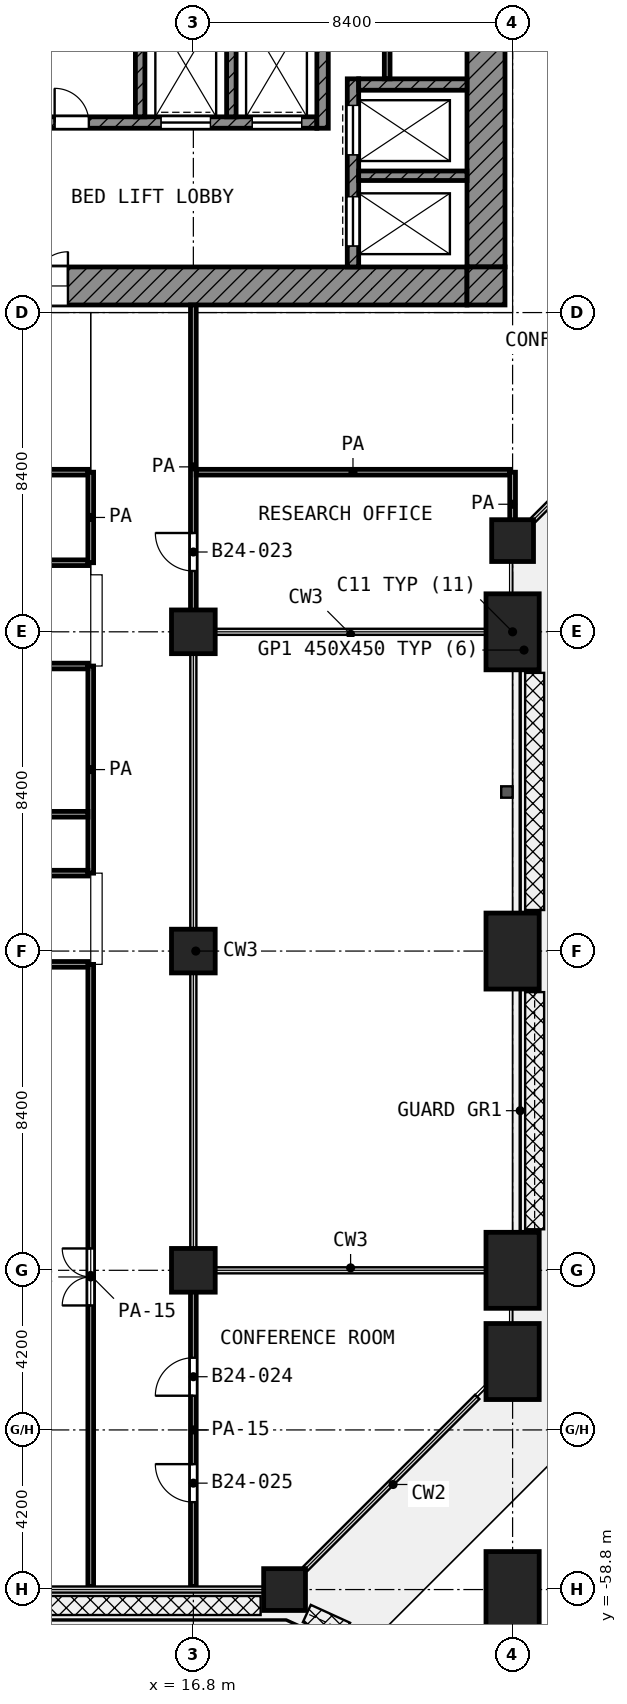
"""IFC4 building model, lengths in metres.
Left out: names, types, materials, properties, quantities, classifications, styles, units other than length and angle.
Written with IfcOpenShell. Run it as: python <this file> out.ifc"""

import sys

from ifc_helpers import new_model, si_unit, direction, frame, frame_2d, origin, origin_2d, place, context, subcontext, project, spatial, rectangle, extrude, element, fill, save


model = new_model("IFC4")
c1 = context("Model", 3, precision=1e-05, world=origin(), true_north=direction((0.0, 1.0)))
c2 = subcontext(c1, "Body", "Model", "MODEL_VIEW")
j1 = project(units=[si_unit("LENGTHUNIT", "METRE"), si_unit("PLANEANGLEUNIT", "RADIAN")], contexts=[c1])
p1 = place(None, origin())
s1 = spatial("IfcSite", under=j1, at=p1, CompositionType="ELEMENT")
p2 = place(p1, origin())
s2 = spatial("IfcBuilding", under=s1, at=p2, CompositionType="ELEMENT")
p3 = place(p2, frame((0.0, 0.0, 107.2)))
s3 = spatial("IfcBuildingStorey", under=s2, at=p3, CompositionType="ELEMENT", Elevation=107.2)
p4 = place(p3, frame((25.2, -31.2, 0.0), z_axis=(0.0, 0.0, 1.0), x_axis=(1.0, 0.0, 0.0)))
e1 = element("IfcColumn", 1, at=p4, inside=s3, PredefinedType="COLUMN", context=c2, shape_type="SweptSolid", body=[
    extrude(rectangle(XDim=1.1, YDim=1.1, at=origin_2d()), origin(), (0.0, 0.0, 1.0), 4.2),
])
for number, where, z_axis, x_axis in (
    (2, (16.8, -33.6, 0.0), (0.0, 0.0, 1.0), (1.0, 0.0, 0.0)),
    (3, (16.8, -42.0, 0.0), (0.0, 0.0, 1.0), (1.0, 0.0, 0.0)),
):
    element("IfcColumn", number, at=place(p3, frame(where, z_axis=z_axis, x_axis=x_axis)), inside=s3, PredefinedType="COLUMN", context=c2, shape_type="SweptSolid", body=[
        extrude(rectangle(XDim=1.15, YDim=1.15, at=origin_2d()), origin(), (0.0, 0.0, 1.0), 4.2),
    ])
p5 = place(p3, frame((25.2, -42.0, 0.0), z_axis=(0.0, 0.0, 1.0), x_axis=(0.0, -1.0, 0.0)))
e4 = element("IfcColumn", 4, at=p5, inside=s3, PredefinedType="COLUMN", context=c2, shape_type="SweptSolid", body=[
    extrude(rectangle(XDim=2.0, YDim=1.4, at=origin_2d()), origin(), (0.0, 0.0, 1.0), 4.2),
])
p6 = place(p3, frame((16.8, -50.4, 0.0), z_axis=(0.0, 0.0, 1.0), x_axis=(1.0, 0.0, 0.0)))
e5 = element("IfcColumn", 5, at=p6, inside=s3, PredefinedType="COLUMN", context=c2, shape_type="SweptSolid", body=[
    extrude(rectangle(XDim=1.15, YDim=1.15, at=origin_2d()), origin(), (0.0, 0.0, 1.0), 4.2),
])
p7 = place(p3, frame((25.2, -52.8, 0.0), z_axis=(0.0, 0.0, 1.0), x_axis=(0.0, -1.0, 0.0)))
e6 = element("IfcColumn", 6, at=p7, inside=s3, PredefinedType="COLUMN", context=c2, shape_type="SweptSolid", body=[
    extrude(rectangle(XDim=2.0, YDim=1.4, at=origin_2d()), origin(), (0.0, 0.0, 1.0), 4.2),
])
p8 = place(p3, frame((19.2, -58.8, 0.0), z_axis=(0.0, 0.0, 1.0), x_axis=(1.0, 0.0, 0.0)))
e7 = element("IfcColumn", 7, at=p8, inside=s3, PredefinedType="COLUMN", context=c2, shape_type="SweptSolid", body=[
    extrude(rectangle(XDim=1.1, YDim=1.1, at=origin_2d()), origin(), (0.0, 0.0, 1.0), 4.2),
])
for number, where, z_axis, x_axis in (
    (8, (25.2, -58.8, 0.0), (0.0, 0.0, 1.0), (0.0, -1.0, 0.0)),
    (9, (25.2, -33.6, 0.0), (0.0, 0.0, 1.0), (0.0, -1.0, 0.0)),
    (10, (25.2, -50.4, 0.0), (0.0, 0.0, 1.0), (0.0, -1.0, 0.0)),
):
    element("IfcColumn", number, at=place(p3, frame(where, z_axis=z_axis, x_axis=x_axis)), inside=s3, PredefinedType="COLUMN", context=c2, shape_type="SweptSolid", body=[
        extrude(rectangle(XDim=2.0, YDim=1.4, at=origin_2d()), origin(), (0.0, 0.0, 1.0), 4.2),
    ])
p9 = place(p3, frame((24.5, -24.0, 0.0), z_axis=(0.0, 0.0, 1.0), x_axis=(0.0, 1.0, 0.0)))
e11 = element("IfcWall", 11, at=p9, inside=s3, PredefinedType="SHEAR", context=c2, shape_type="SweptSolid", body=[
    extrude(rectangle(XDim=18.6, YDim=1.0, at=frame_2d((9.3, 0.0))), origin(), (0.0, 0.0, 1.0), 3.6),
])
p10 = place(p9, frame((10.5, 0.0, 0.0)))
e12 = element("IfcOpeningElement", 12, at=p10, cuts=e11, PredefinedType="OPENING", context=c2, shape_type="SweptSolid", body=[
    extrude(rectangle(XDim=1.8, YDim=2.1, at=frame_2d((0.9, 1.05))), frame((0.0, 0.51, 0.0), z_axis=(0.0, -1.0, 0.0), x_axis=(1.0, 0.0, 0.0)), (0.0, 0.0, 1.0), 1.02),
])
p11 = place(p3, frame((5.4, -24.5, 0.0), z_axis=(0.0, 0.0, 1.0), x_axis=(1.0, 0.0, 0.0)))
e13 = element("IfcWall", 13, at=p11, inside=s3, PredefinedType="SHEAR", context=c2, shape_type="SweptSolid", body=[
    extrude(rectangle(XDim=18.6, YDim=1.0, at=frame_2d((9.3, 0.0))), origin(), (0.0, 0.0, 1.0), 3.6),
])
p12 = place(p11, frame((6.3, 0.0, 0.0)))
e14 = element("IfcOpeningElement", 14, at=p12, cuts=e13, PredefinedType="OPENING", context=c2, shape_type="SweptSolid", body=[
    extrude(rectangle(XDim=1.8, YDim=2.1, at=frame_2d((0.9, 1.05))), frame((0.0, 0.51, 0.0), z_axis=(0.0, -1.0, 0.0), x_axis=(1.0, 0.0, 0.0)), (0.0, 0.0, 1.0), 1.02),
])
p13 = place(p3, frame((24.5, -25.0, 0.0), z_axis=(0.0, 0.0, 1.0), x_axis=(0.0, 1.0, 0.0)))
e15 = element("IfcWall", 15, at=p13, inside=s3, PredefinedType="SHEAR", context=c2, shape_type="SweptSolid", body=[
    extrude(rectangle(XDim=1.0, YDim=1.0, at=frame_2d((0.5, 0.0))), origin(), (0.0, 0.0, 1.0), 3.6),
])
p14 = place(p3, frame((5.4, -20.2, 0.0), z_axis=(0.0, 0.0, 1.0), x_axis=(1.0, 0.0, 0.0)))
e16 = element("IfcWall", 16, at=p14, inside=s3, PredefinedType="SHEAR", context=c2, shape_type="SweptSolid", body=[
    extrude(rectangle(XDim=14.65, YDim=0.3, at=frame_2d((7.325, 0.0))), origin(), (0.0, 0.0, 1.0), 3.6),
])
p15 = place(p14, frame((10.55, 0.0, 0.0)))
e17 = element("IfcOpeningElement", 17, at=p15, cuts=e16, PredefinedType="OPENING", context=c2, shape_type="SweptSolid", body=[
    extrude(rectangle(XDim=1.3, YDim=2.1, at=frame_2d((0.65, 1.05))), frame((0.0, 0.16, 0.0), z_axis=(0.0, -1.0, 0.0), x_axis=(1.0, 0.0, 0.0)), (0.0, 0.0, 1.0), 0.32),
])
p16 = place(p14, frame((12.95, 0.0, 0.0)))
e18 = element("IfcOpeningElement", 18, at=p16, cuts=e16, PredefinedType="OPENING", context=c2, shape_type="SweptSolid", body=[
    extrude(rectangle(XDim=1.3, YDim=2.1, at=frame_2d((0.65, 1.05))), frame((0.0, 0.16, 0.0), z_axis=(0.0, -1.0, 0.0), x_axis=(1.0, 0.0, 0.0)), (0.0, 0.0, 1.0), 0.32),
])
p17 = place(p14, frame((0.55, 0.0, 0.0)))
e19 = element("IfcOpeningElement", 19, at=p17, cuts=e16, PredefinedType="OPENING", context=c2, shape_type="SweptSolid", body=[
    extrude(rectangle(XDim=1.3, YDim=2.1, at=frame_2d((0.65, 1.05))), frame((0.0, 0.16, 0.0), z_axis=(0.0, -1.0, 0.0), x_axis=(1.0, 0.0, 0.0)), (0.0, 0.0, 1.0), 0.32),
])
p18 = place(p14, frame((2.95, 0.0, 0.0)))
e20 = element("IfcOpeningElement", 20, at=p18, cuts=e16, PredefinedType="OPENING", context=c2, shape_type="SweptSolid", body=[
    extrude(rectangle(XDim=1.3, YDim=2.1, at=frame_2d((0.65, 1.05))), frame((0.0, 0.16, 0.0), z_axis=(0.0, -1.0, 0.0), x_axis=(1.0, 0.0, 0.0)), (0.0, 0.0, 1.0), 0.32),
])
p19 = place(p14, frame((5.35, 0.0, 0.0)))
e21 = element("IfcOpeningElement", 21, at=p19, cuts=e16, PredefinedType="OPENING", context=c2, shape_type="SweptSolid", body=[
    extrude(rectangle(XDim=0.9, YDim=2.1, at=frame_2d((0.45, 1.05))), frame((0.0, 0.16, 0.0), z_axis=(0.0, -1.0, 0.0), x_axis=(1.0, 0.0, 0.0)), (0.0, 0.0, 1.0), 0.32),
])
p20 = place(p14, frame((7.75, 0.0, 0.0)))
e22 = element("IfcOpeningElement", 22, at=p20, cuts=e16, PredefinedType="OPENING", context=c2, shape_type="SweptSolid", body=[
    extrude(rectangle(XDim=0.9, YDim=2.1, at=frame_2d((0.45, 1.05))), frame((0.0, 0.16, 0.0), z_axis=(0.0, -1.0, 0.0), x_axis=(1.0, 0.0, 0.0)), (0.0, 0.0, 1.0), 0.32),
])
p21 = place(p3, frame((20.2, -20.35, 0.0), z_axis=(0.0, 0.0, 1.0), x_axis=(0.0, 1.0, 0.0)))
e23 = element("IfcWall", 23, at=p21, inside=s3, PredefinedType="SHEAR", context=c2, shape_type="SweptSolid", body=[
    extrude(rectangle(XDim=3.45, YDim=0.3, at=frame_2d((1.725, 0.0))), origin(), (0.0, 0.0, 1.0), 3.6),
])
p22 = place(p3, frame((21.15, -19.2, 0.0), z_axis=(0.0, 0.0, 1.0), x_axis=(1.0, 0.0, 0.0)))
e24 = element("IfcWall", 24, at=p22, inside=s3, PredefinedType="SHEAR", context=c2, shape_type="SweptSolid", body=[
    extrude(rectangle(XDim=2.85, YDim=0.3, at=frame_2d((1.425, 0.0))), origin(), (0.0, 0.0, 1.0), 3.6),
])
p23 = place(p3, frame((21.0, -24.0, 0.0), z_axis=(0.0, 0.0, 1.0), x_axis=(0.0, 1.0, 0.0)))
e25 = element("IfcWall", 25, at=p23, inside=s3, PredefinedType="SHEAR", context=c2, shape_type="SweptSolid", body=[
    extrude(rectangle(XDim=4.95, YDim=0.3, at=frame_2d((2.475, 0.0))), origin(), (0.0, 0.0, 1.0), 3.6),
])
p24 = place(p23, frame((2.95, 0.0, 0.0)))
e26 = element("IfcOpeningElement", 26, at=p24, cuts=e25, PredefinedType="OPENING", context=c2, shape_type="SweptSolid", body=[
    extrude(rectangle(XDim=1.3, YDim=2.1, at=frame_2d((0.65, 1.05))), frame((0.0, 0.16, 0.0), z_axis=(0.0, -1.0, 0.0), x_axis=(1.0, 0.0, 0.0)), (0.0, 0.0, 1.0), 0.32),
])
p25 = place(p23, frame((0.55, 0.0, 0.0)))
e27 = element("IfcOpeningElement", 27, at=p25, cuts=e25, PredefinedType="OPENING", context=c2, shape_type="SweptSolid", body=[
    extrude(rectangle(XDim=1.3, YDim=2.1, at=frame_2d((0.65, 1.05))), frame((0.0, 0.16, 0.0), z_axis=(0.0, -1.0, 0.0), x_axis=(1.0, 0.0, 0.0)), (0.0, 0.0, 1.0), 0.32),
])
p26 = place(p3, frame((21.15, -21.6, 0.0), z_axis=(0.0, 0.0, 1.0), x_axis=(1.0, 0.0, 0.0)))
e28 = element("IfcWall", 28, at=p26, inside=s3, PredefinedType="SHEAR", context=c2, shape_type="SweptSolid", body=[
    extrude(rectangle(XDim=2.85, YDim=0.25, at=frame_2d((1.425, 0.0))), origin(), (0.0, 0.0, 1.0), 3.6),
])
for number, where, z_axis, x_axis in (
    (29, (15.4, -20.05, 0.0), (0.0, 0.0, 1.0), (0.0, 1.0, 0.0)),
    (30, (17.8, -20.05, 0.0), (0.0, 0.0, 1.0), (0.0, 1.0, 0.0)),
):
    element("IfcWall", number, at=place(p3, frame(where, z_axis=z_axis, x_axis=x_axis)), inside=s3, PredefinedType="SHEAR", context=c2, shape_type="SweptSolid", body=[
        extrude(rectangle(XDim=3.15, YDim=0.25, at=frame_2d((1.575, 0.0))), origin(), (0.0, 0.0, 1.0), 3.6),
    ])
p27 = place(p3, frame((21.9, -19.05, 0.0), z_axis=(0.0, 0.0, 1.0), x_axis=(0.0, 1.0, 0.0)))
e31 = element("IfcWall", 31, at=p27, inside=s3, PredefinedType="PARTITIONING", context=c2, shape_type="SweptSolid", body=[
    extrude(rectangle(XDim=2.15, YDim=0.15, at=frame_2d((1.075, 0.0))), origin(), (0.0, 0.0, 1.0), 3.6),
])
p28 = place(p3, frame((2.326, -42.35, 0.0), z_axis=(0.0, 0.0, 1.0), x_axis=(1.0, 0.0, 0.0)))
e32 = element("IfcWall", 32, at=p28, inside=s3, PredefinedType="PARTITIONING", context=c2, shape_type="SweptSolid", body=[
    extrude(rectangle(XDim=11.699, YDim=0.15, at=frame_2d((5.85, 0.0))), origin(), (0.0, 0.0, 1.0), 3.6),
])
p29 = place(p3, frame((8.65, -39.95, 0.0), z_axis=(0.0, 0.0, 1.0), x_axis=(1.0, 0.0, 0.0)))
e33 = element("IfcWall", 33, at=p29, inside=s3, PredefinedType="PARTITIONING", context=c2, shape_type="SweptSolid", body=[
    extrude(rectangle(XDim=5.375, YDim=0.15, at=frame_2d((2.688, 0.0))), origin(), (0.0, 0.0, 1.0), 3.6),
])
p30 = place(p29, frame((2.225, 0.0, 0.0)))
e34 = element("IfcOpeningElement", 34, at=p30, cuts=e33, PredefinedType="OPENING", context=c2, shape_type="SweptSolid", body=[
    extrude(rectangle(XDim=1.0, YDim=2.1, at=frame_2d((0.5, 1.05))), frame((0.0, 0.085, 0.0), z_axis=(0.0, -1.0, 0.0), x_axis=(1.0, 0.0, 0.0)), (0.0, 0.0, 1.0), 0.17),
])
p31 = place(p3, frame((8.73, -38.4, 0.0), z_axis=(0.0, 0.0, 1.0), x_axis=(1.0, 0.0, 0.0)))
e35 = element("IfcWall", 35, at=p31, inside=s3, PredefinedType="PARTITIONING", context=c2, shape_type="SweptSolid", body=[
    extrude(rectangle(XDim=5.295, YDim=0.15, at=frame_2d((2.647, 0.0))), origin(), (0.0, 0.0, 1.0), 3.6),
])
p32 = place(p3, frame((9.05, -34.5, 0.0), z_axis=(0.0, 0.0, 1.0), x_axis=(1.0, 0.0, 0.0)))
e36 = element("IfcWall", 36, at=p32, inside=s3, PredefinedType="PARTITIONING", context=c2, shape_type="SweptSolid", body=[
    extrude(rectangle(XDim=4.975, YDim=0.15, at=frame_2d((2.487, 0.0))), origin(), (0.0, 0.0, 1.0), 3.6),
])
p33 = place(p32, frame((1.987, 0.0, 0.0)))
e37 = element("IfcOpeningElement", 37, at=p33, cuts=e36, PredefinedType="OPENING", context=c2, shape_type="SweptSolid", body=[
    extrude(rectangle(XDim=1.0, YDim=2.1, at=frame_2d((0.5, 1.05))), frame((0.0, 0.085, 0.0), z_axis=(0.0, -1.0, 0.0), x_axis=(1.0, 0.0, 0.0)), (0.0, 0.0, 1.0), 0.17),
])
p34 = place(p3, frame((0.08, -31.782, 0.0), z_axis=(0.0, 0.0, 1.0), x_axis=(1.0, 0.0, 0.0)))
e38 = element("IfcWall", 38, at=p34, inside=s3, PredefinedType="PARTITIONING", context=c2, shape_type="SweptSolid", body=[
    extrude(rectangle(XDim=13.945, YDim=0.15, at=frame_2d((6.972, 0.0))), origin(), (0.0, 0.0, 1.0), 3.6),
])
p35 = place(p34, frame((6.47, 0.0, 0.0)))
e39 = element("IfcOpeningElement", 39, at=p35, cuts=e38, PredefinedType="OPENING", context=c2, shape_type="SweptSolid", body=[
    extrude(rectangle(XDim=1.0, YDim=2.1, at=frame_2d((0.5, 1.05))), frame((0.0, 0.085, 0.0), z_axis=(0.0, -1.0, 0.0), x_axis=(1.0, 0.0, 0.0)), (0.0, 0.0, 1.0), 0.17),
])
p36 = place(p3, frame((11.177, -29.4, 0.0), z_axis=(0.0, 0.0, 1.0), x_axis=(1.0, 0.0, 0.0)))
e40 = element("IfcWall", 40, at=p36, inside=s3, PredefinedType="PARTITIONING", context=c2, shape_type="SweptSolid", body=[
    extrude(rectangle(XDim=2.848, YDim=0.15, at=frame_2d((1.424, 0.0))), origin(), (0.0, 0.0, 1.0), 3.6),
])
p37 = place(p3, frame((16.875, -29.4, 0.0), z_axis=(0.0, 0.0, 1.0), x_axis=(1.0, 0.0, 0.0)))
e41 = element("IfcWall", 41, at=p37, inside=s3, PredefinedType="PARTITIONING", context=c2, shape_type="SweptSolid", body=[
    extrude(rectangle(XDim=8.25, YDim=0.15, at=frame_2d((4.125, 0.0))), origin(), (0.0, 0.0, 1.0), 3.6),
])
p38 = place(p3, frame((14.1, -58.72, 0.0), z_axis=(0.0, 0.0, 1.0), x_axis=(0.0, 1.0, 0.0)))
e42 = element("IfcWall", 42, at=p38, inside=s3, PredefinedType="PARTITIONING", context=c2, shape_type="SweptSolid", body=[
    extrude(rectangle(XDim=16.37, YDim=0.15, at=frame_2d((8.185, 0.0))), origin(), (0.0, 0.0, 1.0), 2.7),
])
p39 = place(p38, frame((7.395, 0.0, 0.0)))
e43 = element("IfcOpeningElement", 43, at=p39, cuts=e42, PredefinedType="OPENING", context=c2, shape_type="SweptSolid", body=[
    extrude(rectangle(XDim=1.5, YDim=2.1, at=frame_2d((0.75, 1.05))), frame((0.0, 0.085, 0.0), z_axis=(0.0, -1.0, 0.0), x_axis=(1.0, 0.0, 0.0)), (0.0, 0.0, 1.0), 0.17),
])
p40 = place(p3, frame((14.1, -39.95, 0.0), z_axis=(0.0, 0.0, 1.0), x_axis=(0.0, 1.0, 0.0)))
e44 = element("IfcWall", 44, at=p40, inside=s3, PredefinedType="PARTITIONING", context=c2, shape_type="SweptSolid", body=[
    extrude(rectangle(XDim=5.45, YDim=0.15, at=frame_2d((2.725, 0.0))), origin(), (0.0, 0.0, 1.0), 3.6),
])
p41 = place(p3, frame((14.1, -31.782, 0.0), z_axis=(0.0, 0.0, 1.0), x_axis=(0.0, 1.0, 0.0)))
e45 = element("IfcWall", 45, at=p41, inside=s3, PredefinedType="PARTITIONING", context=c2, shape_type="SweptSolid", body=[
    extrude(rectangle(XDim=2.382, YDim=0.15, at=frame_2d((1.191, 0.0))), origin(), (0.0, 0.0, 1.0), 3.6),
])
p42 = place(p3, frame((16.8, -58.72, 0.0), z_axis=(0.0, 0.0, 1.0), x_axis=(0.0, 1.0, 0.0)))
e46 = element("IfcWall", 46, at=p42, inside=s3, PredefinedType="PARTITIONING", context=c2, shape_type="SweptSolid", body=[
    extrude(rectangle(XDim=8.24, YDim=0.15, at=frame_2d((4.12, 0.0))), origin(), (0.0, 0.0, 1.0), 2.7),
])
p43 = place(p42, frame((5.02, 0.0, 0.0)))
e47 = element("IfcOpeningElement", 47, at=p43, cuts=e46, PredefinedType="OPENING", context=c2, shape_type="SweptSolid", body=[
    extrude(rectangle(XDim=1.0, YDim=2.1, at=frame_2d((0.5, 1.05))), frame((0.0, 0.085, 0.0), z_axis=(0.0, -1.0, 0.0), x_axis=(1.0, 0.0, 0.0)), (0.0, 0.0, 1.0), 0.17),
])
p44 = place(p42, frame((2.22, 0.0, 0.0)))
e48 = element("IfcOpeningElement", 48, at=p44, cuts=e46, PredefinedType="OPENING", context=c2, shape_type="SweptSolid", body=[
    extrude(rectangle(XDim=1.0, YDim=2.1, at=frame_2d((0.5, 1.05))), frame((0.0, 0.085, 0.0), z_axis=(0.0, -1.0, 0.0), x_axis=(1.0, 0.0, 0.0)), (0.0, 0.0, 1.0), 0.17),
])
p45 = place(p3, frame((16.8, -33.52, 0.0), z_axis=(0.0, 0.0, 1.0), x_axis=(0.0, 1.0, 0.0)))
e49 = element("IfcWall", 49, at=p45, inside=s3, PredefinedType="PARTITIONING", context=c2, shape_type="SweptSolid", body=[
    extrude(rectangle(XDim=8.52, YDim=0.15, at=frame_2d((4.26, 0.0))), origin(), (0.0, 0.0, 1.0), 3.6),
])
p46 = place(p45, frame((1.52, 0.0, 0.0)))
e50 = element("IfcOpeningElement", 50, at=p46, cuts=e49, PredefinedType="OPENING", context=c2, shape_type="SweptSolid", body=[
    extrude(rectangle(XDim=1.0, YDim=2.1, at=frame_2d((0.5, 1.05))), frame((0.0, 0.085, 0.0), z_axis=(0.0, -1.0, 0.0), x_axis=(1.0, 0.0, 0.0)), (0.0, 0.0, 1.0), 0.17),
])
p47 = place(p3, frame((25.2, -31.087, 0.0), z_axis=(0.0, 0.0, 1.0), x_axis=(0.0, 1.0, 0.0)))
e51 = element("IfcWall", 51, at=p47, inside=s3, PredefinedType="PARTITIONING", context=c2, shape_type="SweptSolid", body=[
    extrude(rectangle(XDim=1.687, YDim=0.15, at=frame_2d((0.844, 0.0))), origin(), (0.0, 0.0, 1.0), 3.6),
])
p48 = place(p24, origin())
e52 = element("IfcDoor", 52, at=p48, inside=s3, OperationType="DOUBLE_DOOR_SLIDING", PredefinedType="DOOR", context=c2, shape_type="SweptSolid", body=[
    extrude(rectangle(XDim=1.3, YDim=2.1, at=frame_2d((0.65, 1.05))), frame((0.0, 0.025, 0.0), z_axis=(0.0, -1.0, 0.0), x_axis=(1.0, 0.0, 0.0)), (0.0, 0.0, 1.0), 0.05),
])
fill(e26, e52)
p49 = place(p25, origin())
e53 = element("IfcDoor", 53, at=p49, inside=s3, OperationType="DOUBLE_DOOR_SLIDING", PredefinedType="DOOR", context=c2, shape_type="SweptSolid", body=[
    extrude(rectangle(XDim=1.3, YDim=2.1, at=frame_2d((0.65, 1.05))), frame((0.0, 0.025, 0.0), z_axis=(0.0, -1.0, 0.0), x_axis=(1.0, 0.0, 0.0)), (0.0, 0.0, 1.0), 0.05),
])
fill(e27, e53)
p50 = place(p15, origin())
e54 = element("IfcDoor", 54, at=p50, inside=s3, OperationType="DOUBLE_DOOR_SLIDING", PredefinedType="DOOR", context=c2, shape_type="SweptSolid", body=[
    extrude(rectangle(XDim=1.3, YDim=2.1, at=frame_2d((0.65, 1.05))), frame((0.0, 0.025, 0.0), z_axis=(0.0, -1.0, 0.0), x_axis=(1.0, 0.0, 0.0)), (0.0, 0.0, 1.0), 0.05),
])
fill(e17, e54)
p51 = place(p16, origin())
e55 = element("IfcDoor", 55, at=p51, inside=s3, OperationType="DOUBLE_DOOR_SLIDING", PredefinedType="DOOR", context=c2, shape_type="SweptSolid", body=[
    extrude(rectangle(XDim=1.3, YDim=2.1, at=frame_2d((0.65, 1.05))), frame((0.0, 0.025, 0.0), z_axis=(0.0, -1.0, 0.0), x_axis=(1.0, 0.0, 0.0)), (0.0, 0.0, 1.0), 0.05),
])
fill(e18, e55)
p52 = place(p12, origin())
e56 = element("IfcDoor", 56, at=p52, inside=s3, OperationType="DOUBLE_DOOR_SINGLE_SWING", PredefinedType="DOOR", context=c2, shape_type="SweptSolid", body=[
    extrude(rectangle(XDim=1.8, YDim=2.1, at=frame_2d((0.9, 1.05))), frame((0.0, 0.025, 0.0), z_axis=(0.0, -1.0, 0.0), x_axis=(1.0, 0.0, 0.0)), (0.0, 0.0, 1.0), 0.05),
])
fill(e14, e56)
p53 = place(p20, origin())
e57 = element("IfcDoor", 57, at=p53, inside=s3, OperationType="SINGLE_SWING_LEFT", PredefinedType="DOOR", context=c2, shape_type="SweptSolid", body=[
    extrude(rectangle(XDim=0.9, YDim=2.1, at=frame_2d((0.45, 1.05))), frame((0.0, 0.025, 0.0), z_axis=(0.0, -1.0, 0.0), x_axis=(1.0, 0.0, 0.0)), (0.0, 0.0, 1.0), 0.05),
])
fill(e22, e57)
p54 = place(p39, origin())
e58 = element("IfcDoor", 58, at=p54, inside=s3, OperationType="DOUBLE_DOOR_SINGLE_SWING", PredefinedType="DOOR", context=c2, shape_type="SweptSolid", body=[
    extrude(rectangle(XDim=1.5, YDim=2.1, at=frame_2d((0.75, 1.05))), frame((0.0, 0.025, 0.0), z_axis=(0.0, -1.0, 0.0), x_axis=(1.0, 0.0, 0.0)), (0.0, 0.0, 1.0), 0.05),
])
fill(e43, e58)
p55 = place(p46, origin())
e59 = element("IfcDoor", 59, at=p55, inside=s3, OperationType="SINGLE_SWING_RIGHT", PredefinedType="DOOR", context=c2, shape_type="SweptSolid", body=[
    extrude(rectangle(XDim=1.0, YDim=2.1, at=frame_2d((0.5, 1.05))), frame((0.0, 0.025, 0.0), z_axis=(0.0, -1.0, 0.0), x_axis=(1.0, 0.0, 0.0)), (0.0, 0.0, 1.0), 0.05),
])
fill(e50, e59)
p56 = place(p43, origin())
e60 = element("IfcDoor", 60, at=p56, inside=s3, OperationType="SINGLE_SWING_LEFT", PredefinedType="DOOR", context=c2, shape_type="SweptSolid", body=[
    extrude(rectangle(XDim=1.0, YDim=2.1, at=frame_2d((0.5, 1.05))), frame((0.0, 0.025, 0.0), z_axis=(0.0, -1.0, 0.0), x_axis=(1.0, 0.0, 0.0)), (0.0, 0.0, 1.0), 0.05),
])
fill(e47, e60)
p57 = place(p44, origin())
e61 = element("IfcDoor", 61, at=p57, inside=s3, OperationType="SINGLE_SWING_RIGHT", PredefinedType="DOOR", context=c2, shape_type="SweptSolid", body=[
    extrude(rectangle(XDim=1.0, YDim=2.1, at=frame_2d((0.5, 1.05))), frame((0.0, 0.025, 0.0), z_axis=(0.0, -1.0, 0.0), x_axis=(1.0, 0.0, 0.0)), (0.0, 0.0, 1.0), 0.05),
])
fill(e48, e61)
save(model, sys.argv[1])
